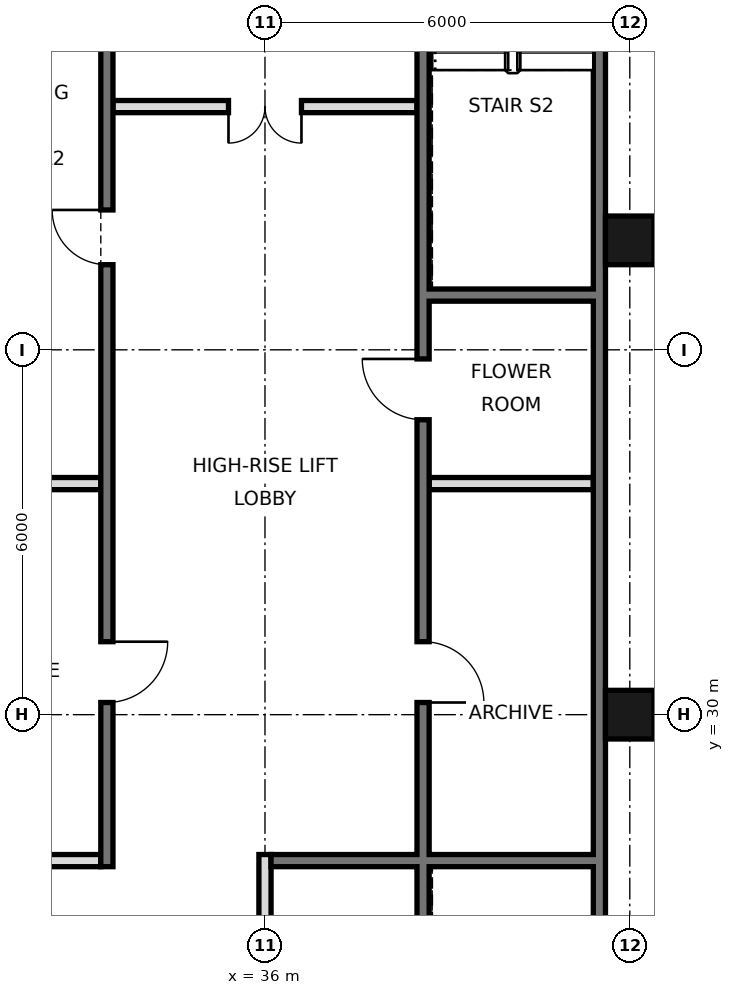
"""IFC4 building model, lengths in metres.
Left out: names, types, materials, properties, quantities, classifications, styles, units other than length and angle.
Written with IfcOpenShell. Run it as: python <this file> out.ifc"""

import sys

from ifc_helpers import new_model, si_unit, direction, frame, frame_2d, origin, origin_2d, place, context, subcontext, project, spatial, rectangle, hollow_rectangle, extrude, element, fill, save


model = new_model("IFC4")
c1 = context("Model", 3, precision=1e-05, world=origin(), true_north=direction((0.0, 1.0)))
c2 = subcontext(c1, "Body", "Model", "MODEL_VIEW")
j1 = project(units=[si_unit("LENGTHUNIT", "METRE"), si_unit("PLANEANGLEUNIT", "RADIAN")], contexts=[c1])
p1 = place(None, origin())
s1 = spatial("IfcSite", under=j1, at=p1, CompositionType="ELEMENT")
p2 = place(p1, origin())
s2 = spatial("IfcBuilding", under=s1, at=p2, CompositionType="ELEMENT")
p3 = place(p2, frame((0.0, 0.0, 110.6)))
s3 = spatial("IfcBuildingStorey", under=s2, at=p3, CompositionType="ELEMENT", Elevation=110.6)
for number, where, z_axis, x_axis in (
    (1, (42.0, 30.0, 0.0), (0.0, 0.0, 1.0), (1.0, 0.0, 0.0)),
    (2, (42.0, 37.8, 0.0), (0.0, 0.0, 1.0), (1.0, 0.0, 0.0)),
):
    element("IfcColumn", number, at=place(p3, frame(where, z_axis=z_axis, x_axis=x_axis)), inside=s3, PredefinedType="COLUMN", context=c2, shape_type="SweptSolid", body=[
        extrude(hollow_rectangle(XDim=0.8, YDim=0.8, WallThickness=0.05, at=origin_2d()), origin(), (0.0, 0.0, 1.0), 3.6),
    ])
p4 = place(p3, frame((41.5, 21.6, 0.0), z_axis=(0.0, 0.0, 1.0), x_axis=(0.0, 1.0, 0.0)))
e3 = element("IfcWall", 3, at=p4, inside=s3, PredefinedType="SOLIDWALL", context=c2, shape_type="SweptSolid", body=[
    extrude(rectangle(XDim=23.5, YDim=0.2, at=frame_2d((11.75, 0.0))), origin(), (0.0, 0.0, 1.0), 3.38),
])
p5 = place(p3, frame((33.4, 27.5, 0.0), z_axis=(0.0, 0.0, 1.0), x_axis=(0.0, 1.0, 0.0)))
e4 = element("IfcWall", 4, at=p5, inside=s3, PredefinedType="SOLIDWALL", context=c2, shape_type="SweptSolid", body=[
    extrude(rectangle(XDim=17.5, YDim=0.2, at=frame_2d((8.75, 0.0))), origin(), (0.0, 0.0, 1.0), 3.38),
])
p6 = place(p5, frame((15.4, 0.0, 0.0)))
e5 = element("IfcOpeningElement", 5, at=p6, cuts=e4, PredefinedType="OPENING", context=c2, shape_type="SweptSolid", body=[
    extrude(rectangle(XDim=1.1, YDim=2.1, at=frame_2d((0.55, 1.05))), frame((0.0, 0.11, 0.0), z_axis=(0.0, -1.0, 0.0), x_axis=(1.0, 0.0, 0.0)), (0.0, 0.0, 1.0), 0.22),
])
p7 = place(p5, frame((2.7, 0.0, 0.0)))
e6 = element("IfcOpeningElement", 6, at=p7, cuts=e4, PredefinedType="OPENING", context=c2, shape_type="SweptSolid", body=[
    extrude(rectangle(XDim=1.0, YDim=2.1, at=frame_2d((0.5, 1.05))), frame((0.0, 0.11, 0.0), z_axis=(0.0, -1.0, 0.0), x_axis=(1.0, 0.0, 0.0)), (0.0, 0.0, 1.0), 0.22),
])
p8 = place(p5, frame((9.9, 0.0, 0.0)))
e7 = element("IfcOpeningElement", 7, at=p8, cuts=e4, PredefinedType="OPENING", context=c2, shape_type="SweptSolid", body=[
    extrude(rectangle(XDim=0.9, YDim=2.1, at=frame_2d((0.45, 1.05))), frame((0.0, 0.11, 0.0), z_axis=(0.0, -1.0, 0.0), x_axis=(1.0, 0.0, 0.0)), (0.0, 0.0, 1.0), 0.22),
])
p9 = place(p3, frame((36.0, 21.6, 0.0), z_axis=(0.0, 0.0, 1.0), x_axis=(0.0, 1.0, 0.0)))
e8 = element("IfcWall", 8, at=p9, inside=s3, PredefinedType="PARTITIONING", context=c2, shape_type="SweptSolid", body=[
    extrude(rectangle(XDim=6.1, YDim=0.2, at=frame_2d((3.05, 0.0))), origin(), (0.0, 0.0, 1.0), 3.38),
])
p10 = place(p3, frame((38.6, 21.6, 0.0), z_axis=(0.0, 0.0, 1.0), x_axis=(0.0, 1.0, 0.0)))
e9 = element("IfcWall", 9, at=p10, inside=s3, PredefinedType="SOLIDWALL", context=c2, shape_type="SweptSolid", body=[
    extrude(rectangle(XDim=23.4, YDim=0.2, at=frame_2d((11.7, 0.0))), origin(), (0.0, 0.0, 1.0), 3.38),
])
p11 = place(p10, frame((8.6, 0.0, 0.0)))
e10 = element("IfcOpeningElement", 10, at=p11, cuts=e9, PredefinedType="OPENING", context=c2, shape_type="SweptSolid", body=[
    extrude(rectangle(XDim=1.0, YDim=2.1, at=frame_2d((0.5, 1.05))), frame((0.0, 0.11, 0.0), z_axis=(0.0, -1.0, 0.0), x_axis=(1.0, 0.0, 0.0)), (0.0, 0.0, 1.0), 0.22),
])
p12 = place(p10, frame((13.25, 0.0, 0.0)))
e11 = element("IfcOpeningElement", 11, at=p12, cuts=e9, PredefinedType="OPENING", context=c2, shape_type="SweptSolid", body=[
    extrude(rectangle(XDim=1.0, YDim=2.1, at=frame_2d((0.5, 1.05))), frame((0.0, 0.11, 0.0), z_axis=(0.0, -1.0, 0.0), x_axis=(1.0, 0.0, 0.0)), (0.0, 0.0, 1.0), 0.22),
])
p13 = place(p10, frame((22.1, 0.0, 0.0)))
e12 = element("IfcOpeningElement", 12, at=p13, cuts=e9, PredefinedType="OPENING", context=c2, shape_type="SweptSolid", body=[
    extrude(rectangle(XDim=1.0, YDim=2.1, at=frame_2d((0.5, 1.05))), frame((0.0, 0.11, 0.0), z_axis=(0.0, -1.0, 0.0), x_axis=(1.0, 0.0, 0.0)), (0.0, 0.0, 1.0), 0.22),
])
p14 = place(p10, frame((0.175, 0.0, 0.0)))
e13 = element("IfcOpeningElement", 13, at=p14, cuts=e9, PredefinedType="OPENING", context=c2, shape_type="SweptSolid", body=[
    extrude(rectangle(XDim=0.9, YDim=2.1, at=frame_2d((0.45, 1.05))), frame((0.0, 0.11, 0.0), z_axis=(0.0, -1.0, 0.0), x_axis=(1.0, 0.0, 0.0)), (0.0, 0.0, 1.0), 0.22),
])
p15 = place(p3, frame((30.6, 27.6, 0.0), z_axis=(0.0, 0.0, 1.0), x_axis=(1.0, 0.0, 0.0)))
e14 = element("IfcWall", 14, at=p15, inside=s3, PredefinedType="PARTITIONING", context=c2, shape_type="SweptSolid", body=[
    extrude(rectangle(XDim=2.7, YDim=0.2, at=frame_2d((1.35, 0.0))), origin(), (0.0, 0.0, 1.0), 3.38),
])
p16 = place(p3, frame((36.1, 27.6, 0.0), z_axis=(0.0, 0.0, 1.0), x_axis=(1.0, 0.0, 0.0)))
e15 = element("IfcWall", 15, at=p16, inside=s3, PredefinedType="SOLIDWALL", context=c2, shape_type="SweptSolid", body=[
    extrude(rectangle(XDim=5.3, YDim=0.2, at=frame_2d((2.65, 0.0))), origin(), (0.0, 0.0, 1.0), 3.38),
])
p17 = place(p3, frame((30.6, 33.8, 0.0), z_axis=(0.0, 0.0, 1.0), x_axis=(1.0, 0.0, 0.0)))
e16 = element("IfcWall", 16, at=p17, inside=s3, PredefinedType="SOLIDWALL", context=c2, shape_type="SweptSolid", body=[
    extrude(rectangle(XDim=2.7, YDim=0.2, at=frame_2d((1.35, 0.0))), origin(), (0.0, 0.0, 1.0), 3.38),
])
p18 = place(p3, frame((38.7, 33.8, 0.0), z_axis=(0.0, 0.0, 1.0), x_axis=(1.0, 0.0, 0.0)))
e17 = element("IfcWall", 17, at=p18, inside=s3, PredefinedType="PARTITIONING", context=c2, shape_type="SweptSolid", body=[
    extrude(rectangle(XDim=2.7, YDim=0.2, at=frame_2d((1.35, 0.0))), origin(), (0.0, 0.0, 1.0), 3.38),
])
p19 = place(p3, frame((38.7, 36.9, 0.0), z_axis=(0.0, 0.0, 1.0), x_axis=(1.0, 0.0, 0.0)))
e18 = element("IfcWall", 18, at=p19, inside=s3, PredefinedType="SOLIDWALL", context=c2, shape_type="SweptSolid", body=[
    extrude(rectangle(XDim=2.7, YDim=0.2, at=frame_2d((1.35, 0.0))), origin(), (0.0, 0.0, 1.0), 3.38),
])
p20 = place(p3, frame((33.5, 40.0, 0.0), z_axis=(0.0, 0.0, 1.0), x_axis=(1.0, 0.0, 0.0)))
e19 = element("IfcWall", 19, at=p20, inside=s3, PredefinedType="PARTITIONING", context=c2, shape_type="SweptSolid", body=[
    extrude(rectangle(XDim=5.0, YDim=0.2, at=frame_2d((2.5, 0.0))), origin(), (0.0, 0.0, 1.0), 3.38),
])
p21 = place(p20, frame((1.9, 0.0, 0.0)))
e20 = element("IfcOpeningElement", 20, at=p21, cuts=e19, PredefinedType="OPENING", context=c2, shape_type="SweptSolid", body=[
    extrude(rectangle(XDim=1.2, YDim=2.1, at=frame_2d((0.6, 1.05))), frame((0.0, 0.11, 0.0), z_axis=(0.0, -1.0, 0.0), x_axis=(1.0, 0.0, 0.0)), (0.0, 0.0, 1.0), 0.22),
])
p22 = place(p21, frame((1.2, 0.0, 0.0), z_axis=(0.0, 0.0, 1.0), x_axis=(-1.0, 0.0, 0.0)))
e21 = element("IfcDoor", 21, at=p22, inside=s3, OperationType="DOUBLE_DOOR_SINGLE_SWING", PredefinedType="DOOR", context=c2, shape_type="SweptSolid", body=[
    extrude(rectangle(XDim=1.2, YDim=2.1, at=frame_2d((0.6, 1.05))), frame((0.0, 0.025, 0.0), z_axis=(0.0, -1.0, 0.0), x_axis=(1.0, 0.0, 0.0)), (0.0, 0.0, 1.0), 0.05),
])
fill(e20, e21)
p23 = place(p11, frame((1.0, 0.0, 0.0), z_axis=(0.0, 0.0, 1.0), x_axis=(-1.0, 0.0, 0.0)))
e22 = element("IfcDoor", 22, at=p23, inside=s3, OperationType="SINGLE_SWING_RIGHT", PredefinedType="DOOR", context=c2, shape_type="SweptSolid", body=[
    extrude(rectangle(XDim=1.0, YDim=2.1, at=frame_2d((0.5, 1.05))), frame((0.0, 0.025, 0.0), z_axis=(0.0, -1.0, 0.0), x_axis=(1.0, 0.0, 0.0)), (0.0, 0.0, 1.0), 0.05),
])
fill(e10, e22)
p24 = place(p12, frame((1.0, 0.0, 0.0), z_axis=(0.0, 0.0, 1.0), x_axis=(-1.0, 0.0, 0.0)))
e23 = element("IfcDoor", 23, at=p24, inside=s3, OperationType="SINGLE_SWING_LEFT", PredefinedType="DOOR", context=c2, shape_type="SweptSolid", body=[
    extrude(rectangle(XDim=1.0, YDim=2.1, at=frame_2d((0.5, 1.05))), frame((0.0, 0.025, 0.0), z_axis=(0.0, -1.0, 0.0), x_axis=(1.0, 0.0, 0.0)), (0.0, 0.0, 1.0), 0.05),
])
fill(e11, e23)
p25 = place(p7, origin())
e24 = element("IfcDoor", 24, at=p25, inside=s3, OperationType="SINGLE_SWING_RIGHT", PredefinedType="DOOR", context=c2, shape_type="SweptSolid", body=[
    extrude(rectangle(XDim=1.0, YDim=2.1, at=frame_2d((0.5, 1.05))), frame((0.0, 0.025, 0.0), z_axis=(0.0, -1.0, 0.0), x_axis=(1.0, 0.0, 0.0)), (0.0, 0.0, 1.0), 0.05),
])
fill(e6, e24)
p26 = place(p8, frame((0.9, 0.0, 0.0), z_axis=(0.0, 0.0, 1.0), x_axis=(-1.0, 0.0, 0.0)))
e25 = element("IfcDoor", 25, at=p26, inside=s3, OperationType="SINGLE_SWING_LEFT", PredefinedType="DOOR", context=c2, shape_type="SweptSolid", body=[
    extrude(rectangle(XDim=0.9, YDim=2.1, at=frame_2d((0.45, 1.05))), frame((0.0, 0.025, 0.0), z_axis=(0.0, -1.0, 0.0), x_axis=(1.0, 0.0, 0.0)), (0.0, 0.0, 1.0), 0.05),
])
fill(e7, e25)
save(model, sys.argv[1])
